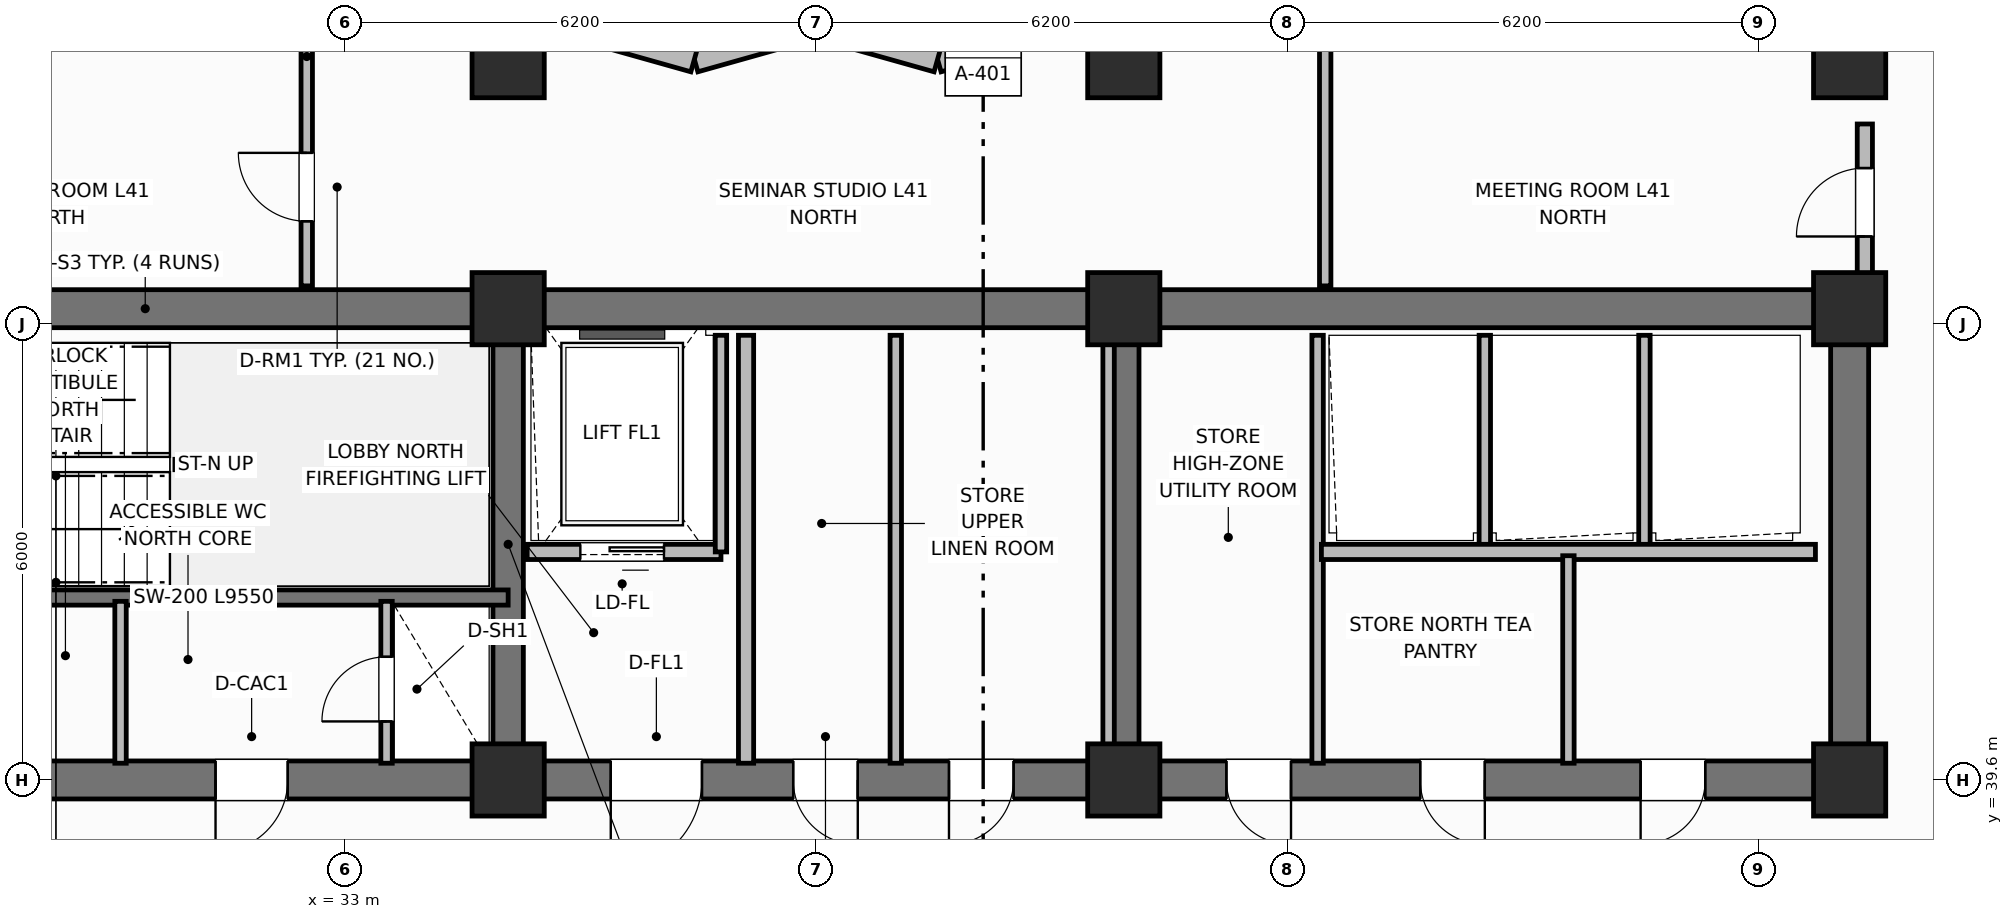
"""IFC4 building model, lengths in metres.
Left out: names, types, materials, properties, quantities, classifications, styles, units other than length and angle.
Written with IfcOpenShell. Run it as: python <this file> out.ifc"""

import sys

from ifc_helpers import new_model, si_unit, direction, frame, frame_2d, origin, origin_2d, place, context, subcontext, project, spatial, rectangle, extrude, element, fill, save


model = new_model("IFC4")
c1 = context("Model", 3, precision=1e-05, world=origin(), true_north=direction((0.0, 1.0)))
c2 = subcontext(c1, "Body", "Model", "MODEL_VIEW")
j1 = project(units=[si_unit("LENGTHUNIT", "METRE"), si_unit("PLANEANGLEUNIT", "RADIAN")], contexts=[c1])
p1 = place(None, origin())
s1 = spatial("IfcSite", under=j1, at=p1, CompositionType="ELEMENT")
p2 = place(p1, origin())
s2 = spatial("IfcBuilding", under=s1, at=p2, CompositionType="ELEMENT")
p3 = place(p2, frame((0.0, 0.0, 166.3)))
s3 = spatial("IfcBuildingStorey", under=s2, at=p3, CompositionType="ELEMENT", Elevation=166.3)
p4 = place(p3, frame((25.6, 45.8, 0.0), z_axis=(0.0, 0.0, 1.0), x_axis=(1.0, 0.0, 0.0)))
e1 = element("IfcWall", 1, at=p4, inside=s3, PredefinedType="SHEAR", context=c2, shape_type="SweptSolid", body=[
    extrude(rectangle(XDim=27.2, YDim=0.5, at=frame_2d((13.6, 0.0))), origin(), (0.0, 0.0, 1.0), 3.7),
])
p5 = place(p3, frame((52.8, 39.85, 0.0), z_axis=(0.0, 0.0, 1.0), x_axis=(0.0, 1.0, 0.0)))
e2 = element("IfcWall", 2, at=p5, inside=s3, PredefinedType="SHEAR", context=c2, shape_type="SweptSolid", body=[
    extrude(rectangle(XDim=5.7, YDim=0.5, at=frame_2d((2.85, 0.0))), origin(), (0.0, 0.0, 1.0), 3.7),
])
p6 = place(p3, frame((52.8, 39.6, 0.0), z_axis=(0.0, 0.0, 1.0), x_axis=(-1.0, 0.0, 0.0)))
e3 = element("IfcWall", 3, at=p6, inside=s3, PredefinedType="SHEAR", context=c2, shape_type="SweptSolid", body=[
    extrude(rectangle(XDim=27.2, YDim=0.5, at=frame_2d((13.6, 0.0))), origin(), (0.0, 0.0, 1.0), 3.7),
])
p7 = place(p6, frame((24.2, 0.0, 0.0)))
e4 = element("IfcOpeningElement", 4, at=p7, cuts=e3, PredefinedType="OPENING", context=c2, shape_type="SweptSolid", body=[
    extrude(rectangle(XDim=1.1, YDim=2.15, at=frame_2d((0.55, 1.075))), frame((0.0, 0.26, 0.0), z_axis=(0.0, -1.0, 0.0), x_axis=(1.0, 0.0, 0.0)), (0.0, 0.0, 1.0), 0.52),
])
p8 = place(p6, frame((20.55, 0.0, 0.0)))
e5 = element("IfcOpeningElement", 5, at=p8, cuts=e3, PredefinedType="OPENING", context=c2, shape_type="SweptSolid", body=[
    extrude(rectangle(XDim=0.95, YDim=2.1, at=frame_2d((0.475, 1.05))), frame((0.0, 0.26, 0.0), z_axis=(0.0, -1.0, 0.0), x_axis=(1.0, 0.0, 0.0)), (0.0, 0.0, 1.0), 0.52),
])
p9 = place(p6, frame((15.1, 0.0, 0.0)))
e6 = element("IfcOpeningElement", 6, at=p9, cuts=e3, PredefinedType="OPENING", context=c2, shape_type="SweptSolid", body=[
    extrude(rectangle(XDim=1.2, YDim=2.15, at=frame_2d((0.6, 1.075))), frame((0.0, 0.26, 0.0), z_axis=(0.0, -1.0, 0.0), x_axis=(1.0, 0.0, 0.0)), (0.0, 0.0, 1.0), 0.52),
])
p10 = place(p6, frame((13.05, 0.0, 0.0)))
e7 = element("IfcOpeningElement", 7, at=p10, cuts=e3, PredefinedType="OPENING", context=c2, shape_type="SweptSolid", body=[
    extrude(rectangle(XDim=0.85, YDim=2.1, at=frame_2d((0.425, 1.05))), frame((0.0, 0.26, 0.0), z_axis=(0.0, -1.0, 0.0), x_axis=(1.0, 0.0, 0.0)), (0.0, 0.0, 1.0), 0.52),
])
p11 = place(p6, frame((11.0, 0.0, 0.0)))
e8 = element("IfcOpeningElement", 8, at=p11, cuts=e3, PredefinedType="OPENING", context=c2, shape_type="SweptSolid", body=[
    extrude(rectangle(XDim=0.85, YDim=2.1, at=frame_2d((0.425, 1.05))), frame((0.0, 0.26, 0.0), z_axis=(0.0, -1.0, 0.0), x_axis=(1.0, 0.0, 0.0)), (0.0, 0.0, 1.0), 0.52),
])
p12 = place(p6, frame((7.35, 0.0, 0.0)))
e9 = element("IfcOpeningElement", 9, at=p12, cuts=e3, PredefinedType="OPENING", context=c2, shape_type="SweptSolid", body=[
    extrude(rectangle(XDim=0.85, YDim=2.1, at=frame_2d((0.425, 1.05))), frame((0.0, 0.26, 0.0), z_axis=(0.0, -1.0, 0.0), x_axis=(1.0, 0.0, 0.0)), (0.0, 0.0, 1.0), 0.52),
])
p13 = place(p6, frame((4.8, 0.0, 0.0)))
e10 = element("IfcOpeningElement", 10, at=p13, cuts=e3, PredefinedType="OPENING", context=c2, shape_type="SweptSolid", body=[
    extrude(rectangle(XDim=0.85, YDim=2.1, at=frame_2d((0.425, 1.05))), frame((0.0, 0.26, 0.0), z_axis=(0.0, -1.0, 0.0), x_axis=(1.0, 0.0, 0.0)), (0.0, 0.0, 1.0), 0.52),
])
p14 = place(p6, frame((1.9, 0.0, 0.0)))
e11 = element("IfcOpeningElement", 11, at=p14, cuts=e3, PredefinedType="OPENING", context=c2, shape_type="SweptSolid", body=[
    extrude(rectangle(XDim=0.85, YDim=2.1, at=frame_2d((0.425, 1.05))), frame((0.0, 0.26, 0.0), z_axis=(0.0, -1.0, 0.0), x_axis=(1.0, 0.0, 0.0)), (0.0, 0.0, 1.0), 0.52),
])
for number, where, z_axis, x_axis in (
    (12, (35.15, 39.85, 0.0), (0.0, 0.0, 1.0), (0.0, 1.0, 0.0)),
    (13, (43.25, 39.85, 0.0), (0.0, 0.0, 1.0), (0.0, 1.0, 0.0)),
):
    element("IfcWall", number, at=place(p3, frame(where, z_axis=z_axis, x_axis=x_axis)), inside=s3, PredefinedType="SHEAR", context=c2, shape_type="SweptSolid", body=[
        extrude(rectangle(XDim=5.7, YDim=0.4, at=frame_2d((2.85, 0.0))), origin(), (0.0, 0.0, 1.0), 3.7),
    ])
for number, where, z_axis, x_axis in (
    (14, (35.15, 39.6, 0.0), (0.0, 0.0, 1.0), (1.0, 0.0, 0.0)),
    (15, (35.15, 45.8, 0.0), (0.0, 0.0, 1.0), (1.0, 0.0, 0.0)),
    (16, (43.25, 39.6, 0.0), (0.0, 0.0, 1.0), (1.0, 0.0, 0.0)),
    (17, (43.25, 45.8, 0.0), (0.0, 0.0, 1.0), (1.0, 0.0, 0.0)),
    (18, (52.8, 39.6, 0.0), (0.0, 0.0, 1.0), (1.0, 0.0, 0.0)),
    (19, (52.8, 45.8, 0.0), (0.0, 0.0, 1.0), (1.0, 0.0, 0.0)),
    (20, (35.15, 49.05, 0.0), (0.0, 0.0, 1.0), (1.0, 0.0, 0.0)),
    (21, (43.25, 49.05, 0.0), (0.0, 0.0, 1.0), (1.0, 0.0, 0.0)),
    (22, (52.8, 49.05, 0.0), (0.0, 0.0, 1.0), (1.0, 0.0, 0.0)),
):
    element("IfcColumn", number, at=place(p3, frame(where, z_axis=z_axis, x_axis=x_axis)), inside=s3, PredefinedType="COLUMN", context=c2, shape_type="SweptSolid", body=[
        extrude(rectangle(XDim=0.95, YDim=0.95, at=origin_2d()), origin(), (0.0, 0.0, 1.0), 3.7),
    ])
p15 = place(p3, frame((42.4, 49.53, 0.0), z_axis=(0.0, 0.0, 1.0), x_axis=(-0.962652136636, -0.270741322725, 0.0)))
e23 = element("IfcWall", 23, at=p15, inside=s3, PredefinedType="SOLIDWALL", context=c2, shape_type="SweptSolid", body=[
    extrude(rectangle(XDim=1.662, YDim=0.34, at=frame_2d((0.831, 0.0))), origin(), (0.0, 0.0, 1.0), 2.72),
])
p16 = place(p3, frame((40.8, 49.08, 0.0), z_axis=(0.0, 0.0, 1.0), x_axis=(-0.962662902433, 0.270703040766, 0.0)))
e24 = element("IfcWall", 24, at=p16, inside=s3, PredefinedType="SOLIDWALL", context=c2, shape_type="SweptSolid", body=[
    extrude(rectangle(XDim=1.662, YDim=0.34, at=frame_2d((0.831, 0.0))), origin(), (0.0, 0.0, 1.0), 2.72),
])
p17 = place(p3, frame((39.2, 49.53, 0.0), z_axis=(0.0, 0.0, 1.0), x_axis=(-0.962652136636, -0.270741322725, 0.0)))
e25 = element("IfcWall", 25, at=p17, inside=s3, PredefinedType="SOLIDWALL", context=c2, shape_type="SweptSolid", body=[
    extrude(rectangle(XDim=1.662, YDim=0.34, at=frame_2d((0.831, 0.0))), origin(), (0.0, 0.0, 1.0), 2.72),
])
p18 = place(p3, frame((37.6, 49.08, 0.0), z_axis=(0.0, 0.0, 1.0), x_axis=(-0.962662902433, 0.270703040766, 0.0)))
e26 = element("IfcWall", 26, at=p18, inside=s3, PredefinedType="SOLIDWALL", context=c2, shape_type="SweptSolid", body=[
    extrude(rectangle(XDim=1.662, YDim=0.34, at=frame_2d((0.831, 0.0))), origin(), (0.0, 0.0, 1.0), 2.72),
])
p19 = place(p3, frame((35.15, 42.0, 0.0), z_axis=(0.0, 0.0, 1.0), x_axis=(-1.0, 0.0, 0.0)))
e27 = element("IfcWall", 27, at=p19, inside=s3, PredefinedType="SHEAR", context=c2, shape_type="SweptSolid", body=[
    extrude(rectangle(XDim=9.55, YDim=0.2, at=frame_2d((4.775, 0.0))), origin(), (0.0, 0.0, 1.0), 3.7),
])
p20 = place(p19, frame((7.25, 0.0, 0.0)))
e28 = element("IfcOpeningElement", 28, at=p20, cuts=e27, PredefinedType="OPENING", context=c2, shape_type="SweptSolid", body=[
    extrude(rectangle(XDim=1.1, YDim=2.15, at=frame_2d((0.55, 1.075))), frame((0.0, 0.11, 0.0), z_axis=(0.0, -1.0, 0.0), x_axis=(1.0, 0.0, 0.0)), (0.0, 0.0, 1.0), 0.22),
])
p21 = place(p3, frame((33.55, 39.82, 0.0), z_axis=(0.0, 0.0, 1.0), x_axis=(0.0, 1.0, 0.0)))
e29 = element("IfcWall", 29, at=p21, inside=s3, PredefinedType="PARTITIONING", context=c2, shape_type="SweptSolid", body=[
    extrude(rectangle(XDim=2.13, YDim=0.15, at=frame_2d((1.065, 0.0))), origin(), (0.0, 0.0, 1.0), 2.55),
])
p22 = place(p21, frame((0.55, 0.0, 0.0)))
e30 = element("IfcOpeningElement", 30, at=p22, cuts=e29, PredefinedType="OPENING", context=c2, shape_type="SweptSolid", body=[
    extrude(rectangle(XDim=0.85, YDim=2.05, at=frame_2d((0.425, 1.025))), frame((0.0, 0.085, 0.0), z_axis=(0.0, -1.0, 0.0), x_axis=(1.0, 0.0, 0.0)), (0.0, 0.0, 1.0), 0.17),
])
p23 = place(p3, frame((30.05, 39.82, 0.0), z_axis=(0.0, 0.0, 1.0), x_axis=(0.0, 1.0, 0.0)))
e31 = element("IfcWall", 31, at=p23, inside=s3, PredefinedType="PARTITIONING", context=c2, shape_type="SweptSolid", body=[
    extrude(rectangle(XDim=2.13, YDim=0.15, at=frame_2d((1.065, 0.0))), origin(), (0.0, 0.0, 1.0), 2.55),
])
p24 = place(p3, frame((37.95, 42.6, 0.0), z_axis=(0.0, 0.0, 1.0), x_axis=(-1.0, 0.0, 0.0)))
e32 = element("IfcWall", 32, at=p24, inside=s3, PredefinedType="PARTITIONING", context=c2, shape_type="SweptSolid", body=[
    extrude(rectangle(XDim=2.55, YDim=0.2, at=frame_2d((1.275, 0.0))), origin(), (0.0, 0.0, 1.0), 2.32),
])
p25 = place(p24, frame((0.75, 0.0, 0.0)))
e33 = element("IfcOpeningElement", 33, at=p25, cuts=e32, PredefinedType="OPENING", context=c2, shape_type="SweptSolid", body=[
    extrude(rectangle(XDim=1.1, YDim=2.15, at=frame_2d((0.55, 1.075))), frame((0.0, 0.11, 0.0), z_axis=(0.0, -1.0, 0.0), x_axis=(1.0, 0.0, 0.0)), (0.0, 0.0, 1.0), 0.22),
])
p26 = place(p3, frame((37.95, 42.6, 0.0), z_axis=(0.0, 0.0, 1.0), x_axis=(0.0, 1.0, 0.0)))
e34 = element("IfcWall", 34, at=p26, inside=s3, PredefinedType="PARTITIONING", context=c2, shape_type="SweptSolid", body=[
    extrude(rectangle(XDim=2.85, YDim=0.15, at=frame_2d((1.425, 0.0))), origin(), (0.0, 0.0, 1.0), 2.55),
])
p27 = place(p3, frame((38.28, 39.82, 0.0), z_axis=(0.0, 0.0, 1.0), x_axis=(0.0, 1.0, 0.0)))
e35 = element("IfcWall", 35, at=p27, inside=s3, PredefinedType="PARTITIONING", context=c2, shape_type="SweptSolid", body=[
    extrude(rectangle(XDim=5.63, YDim=0.2, at=frame_2d((2.815, 0.0))), origin(), (0.0, 0.0, 1.0), 2.55),
])
for number, where, z_axis, x_axis in (
    (36, (43.05, 39.82, 0.0), (0.0, 0.0, 1.0), (0.0, 1.0, 0.0)),
    (37, (40.25, 39.82, 0.0), (0.0, 0.0, 1.0), (0.0, 1.0, 0.0)),
    (38, (45.8, 39.82, 0.0), (0.0, 0.0, 1.0), (0.0, 1.0, 0.0)),
):
    element("IfcWall", number, at=place(p3, frame(where, z_axis=z_axis, x_axis=x_axis)), inside=s3, PredefinedType="PARTITIONING", context=c2, shape_type="SweptSolid", body=[
        extrude(rectangle(XDim=5.63, YDim=0.15, at=frame_2d((2.815, 0.0))), origin(), (0.0, 0.0, 1.0), 2.55),
    ])
for number, where, z_axis, x_axis in (
    (39, (48.0, 42.65, 0.0), (0.0, 0.0, 1.0), (0.0, 1.0, 0.0)),
    (40, (50.1, 42.65, 0.0), (0.0, 0.0, 1.0), (0.0, 1.0, 0.0)),
):
    element("IfcWall", number, at=place(p3, frame(where, z_axis=z_axis, x_axis=x_axis)), inside=s3, PredefinedType="PARTITIONING", context=c2, shape_type="SweptSolid", body=[
        extrude(rectangle(XDim=2.8, YDim=0.15, at=frame_2d((1.4, 0.0))), origin(), (0.0, 0.0, 1.0), 2.55),
    ])
p28 = place(p3, frame((52.35, 42.6, 0.0), z_axis=(0.0, 0.0, 1.0), x_axis=(-1.0, 0.0, 0.0)))
e41 = element("IfcWall", 41, at=p28, inside=s3, PredefinedType="PARTITIONING", context=c2, shape_type="SweptSolid", body=[
    extrude(rectangle(XDim=6.5, YDim=0.2, at=frame_2d((3.25, 0.0))), origin(), (0.0, 0.0, 1.0), 2.55),
])
p29 = place(p3, frame((49.1, 39.82, 0.0), z_axis=(0.0, 0.0, 1.0), x_axis=(0.0, 1.0, 0.0)))
e42 = element("IfcWall", 42, at=p29, inside=s3, PredefinedType="PARTITIONING", context=c2, shape_type="SweptSolid", body=[
    extrude(rectangle(XDim=2.73, YDim=0.15, at=frame_2d((1.365, 0.0))), origin(), (0.0, 0.0, 1.0), 2.55),
])
p30 = place(p3, frame((32.5, 46.1, 0.0), z_axis=(0.0, 0.0, 1.0), x_axis=(0.0, 1.0, 0.0)))
e43 = element("IfcWall", 43, at=p30, inside=s3, PredefinedType="PARTITIONING", context=c2, shape_type="SweptSolid", body=[
    extrude(rectangle(XDim=3.43, YDim=0.15, at=frame_2d((1.715, 0.0))), origin(), (0.0, 0.0, 1.0), 2.55),
])
p31 = place(p30, frame((0.85, 0.0, 0.0)))
e44 = element("IfcOpeningElement", 44, at=p31, cuts=e43, PredefinedType="OPENING", context=c2, shape_type="SweptSolid", body=[
    extrude(rectangle(XDim=0.9, YDim=2.1, at=frame_2d((0.45, 1.05))), frame((0.0, 0.085, 0.0), z_axis=(0.0, -1.0, 0.0), x_axis=(1.0, 0.0, 0.0)), (0.0, 0.0, 1.0), 0.17),
])
p32 = place(p3, frame((45.9, 46.1, 0.0), z_axis=(0.0, 0.0, 1.0), x_axis=(0.0, 1.0, 0.0)))
e45 = element("IfcWall", 45, at=p32, inside=s3, PredefinedType="PARTITIONING", context=c2, shape_type="SweptSolid", body=[
    extrude(rectangle(XDim=3.43, YDim=0.15, at=frame_2d((1.715, 0.0))), origin(), (0.0, 0.0, 1.0), 2.55),
])
p33 = place(p3, frame((53.0, 46.1, 0.0), z_axis=(0.0, 0.0, 1.0), x_axis=(0.0, 1.0, 0.0)))
e46 = element("IfcWall", 46, at=p33, inside=s3, PredefinedType="PARTITIONING", context=c2, shape_type="SweptSolid", body=[
    extrude(rectangle(XDim=2.13, YDim=0.2, at=frame_2d((1.065, 0.0))), origin(), (0.0, 0.0, 1.0), 2.55),
])
p34 = place(p33, frame((0.65, 0.0, 0.0)))
e47 = element("IfcOpeningElement", 47, at=p34, cuts=e46, PredefinedType="OPENING", context=c2, shape_type="SweptSolid", body=[
    extrude(rectangle(XDim=0.9, YDim=2.1, at=frame_2d((0.45, 1.05))), frame((0.0, 0.11, 0.0), z_axis=(0.0, -1.0, 0.0), x_axis=(1.0, 0.0, 0.0)), (0.0, 0.0, 1.0), 0.22),
])
p35 = place(p22, origin())
e48 = element("IfcDoor", 48, at=p35, inside=s3, OperationType="SINGLE_SWING_LEFT", PredefinedType="TRAPDOOR", context=c2, shape_type="SweptSolid", body=[
    extrude(rectangle(XDim=0.85, YDim=2.05, at=frame_2d((0.425, 1.025))), frame((0.0, 0.025, 0.0), z_axis=(0.0, -1.0, 0.0), x_axis=(1.0, 0.0, 0.0)), (0.0, 0.0, 1.0), 0.05),
])
fill(e30, e48)
p36 = place(p25, origin())
e49 = element("IfcDoor", 49, at=p36, inside=s3, OperationType="SLIDING_TO_LEFT", PredefinedType="DOOR", context=c2, shape_type="SweptSolid", body=[
    extrude(rectangle(XDim=1.1, YDim=2.15, at=frame_2d((0.55, 1.075))), frame((0.0, 0.025, 0.0), z_axis=(0.0, -1.0, 0.0), x_axis=(1.0, 0.0, 0.0)), (0.0, 0.0, 1.0), 0.05),
])
fill(e33, e49)
p37 = place(p31, origin())
e50 = element("IfcDoor", 50, at=p37, inside=s3, OperationType="SINGLE_SWING_RIGHT", PredefinedType="DOOR", context=c2, shape_type="SweptSolid", body=[
    extrude(rectangle(XDim=0.9, YDim=2.1, at=frame_2d((0.45, 1.05))), frame((0.0, 0.025, 0.0), z_axis=(0.0, -1.0, 0.0), x_axis=(1.0, 0.0, 0.0)), (0.0, 0.0, 1.0), 0.05),
])
fill(e44, e50)
p38 = place(p34, origin())
e51 = element("IfcDoor", 51, at=p38, inside=s3, OperationType="SINGLE_SWING_LEFT", PredefinedType="DOOR", context=c2, shape_type="SweptSolid", body=[
    extrude(rectangle(XDim=0.9, YDim=2.1, at=frame_2d((0.45, 1.05))), frame((0.0, 0.025, 0.0), z_axis=(0.0, -1.0, 0.0), x_axis=(1.0, 0.0, 0.0)), (0.0, 0.0, 1.0), 0.05),
])
fill(e47, e51)
p39 = place(p8, origin())
e52 = element("IfcDoor", 52, at=p39, inside=s3, OperationType="SINGLE_SWING_RIGHT", PredefinedType="DOOR", context=c2, shape_type="SweptSolid", body=[
    extrude(rectangle(XDim=0.95, YDim=2.1, at=frame_2d((0.475, 1.05))), frame((0.0, 0.025, 0.0), z_axis=(0.0, -1.0, 0.0), x_axis=(1.0, 0.0, 0.0)), (0.0, 0.0, 1.0), 0.05),
])
fill(e5, e52)
p40 = place(p9, origin())
e53 = element("IfcDoor", 53, at=p40, inside=s3, OperationType="SINGLE_SWING_RIGHT", PredefinedType="DOOR", context=c2, shape_type="SweptSolid", body=[
    extrude(rectangle(XDim=1.2, YDim=2.15, at=frame_2d((0.6, 1.075))), frame((0.0, 0.025, 0.0), z_axis=(0.0, -1.0, 0.0), x_axis=(1.0, 0.0, 0.0)), (0.0, 0.0, 1.0), 0.05),
])
fill(e6, e53)
p41 = place(p10, origin())
e54 = element("IfcDoor", 54, at=p41, inside=s3, OperationType="SINGLE_SWING_LEFT", PredefinedType="DOOR", context=c2, shape_type="SweptSolid", body=[
    extrude(rectangle(XDim=0.85, YDim=2.1, at=frame_2d((0.425, 1.05))), frame((0.0, 0.025, 0.0), z_axis=(0.0, -1.0, 0.0), x_axis=(1.0, 0.0, 0.0)), (0.0, 0.0, 1.0), 0.05),
])
fill(e7, e54)
p42 = place(p11, origin())
e55 = element("IfcDoor", 55, at=p42, inside=s3, OperationType="SINGLE_SWING_RIGHT", PredefinedType="DOOR", context=c2, shape_type="SweptSolid", body=[
    extrude(rectangle(XDim=0.85, YDim=2.1, at=frame_2d((0.425, 1.05))), frame((0.0, 0.025, 0.0), z_axis=(0.0, -1.0, 0.0), x_axis=(1.0, 0.0, 0.0)), (0.0, 0.0, 1.0), 0.05),
])
fill(e8, e55)
p43 = place(p12, origin())
e56 = element("IfcDoor", 56, at=p43, inside=s3, OperationType="SINGLE_SWING_LEFT", PredefinedType="DOOR", context=c2, shape_type="SweptSolid", body=[
    extrude(rectangle(XDim=0.85, YDim=2.1, at=frame_2d((0.425, 1.05))), frame((0.0, 0.025, 0.0), z_axis=(0.0, -1.0, 0.0), x_axis=(1.0, 0.0, 0.0)), (0.0, 0.0, 1.0), 0.05),
])
fill(e9, e56)
p44 = place(p13, origin())
e57 = element("IfcDoor", 57, at=p44, inside=s3, OperationType="SINGLE_SWING_LEFT", PredefinedType="DOOR", context=c2, shape_type="SweptSolid", body=[
    extrude(rectangle(XDim=0.85, YDim=2.1, at=frame_2d((0.425, 1.05))), frame((0.0, 0.025, 0.0), z_axis=(0.0, -1.0, 0.0), x_axis=(1.0, 0.0, 0.0)), (0.0, 0.0, 1.0), 0.05),
])
fill(e10, e57)
p45 = place(p14, origin())
e58 = element("IfcDoor", 58, at=p45, inside=s3, OperationType="SINGLE_SWING_RIGHT", PredefinedType="DOOR", context=c2, shape_type="SweptSolid", body=[
    extrude(rectangle(XDim=0.85, YDim=2.1, at=frame_2d((0.425, 1.05))), frame((0.0, 0.025, 0.0), z_axis=(0.0, -1.0, 0.0), x_axis=(1.0, 0.0, 0.0)), (0.0, 0.0, 1.0), 0.05),
])
fill(e11, e58)
save(model, sys.argv[1])
